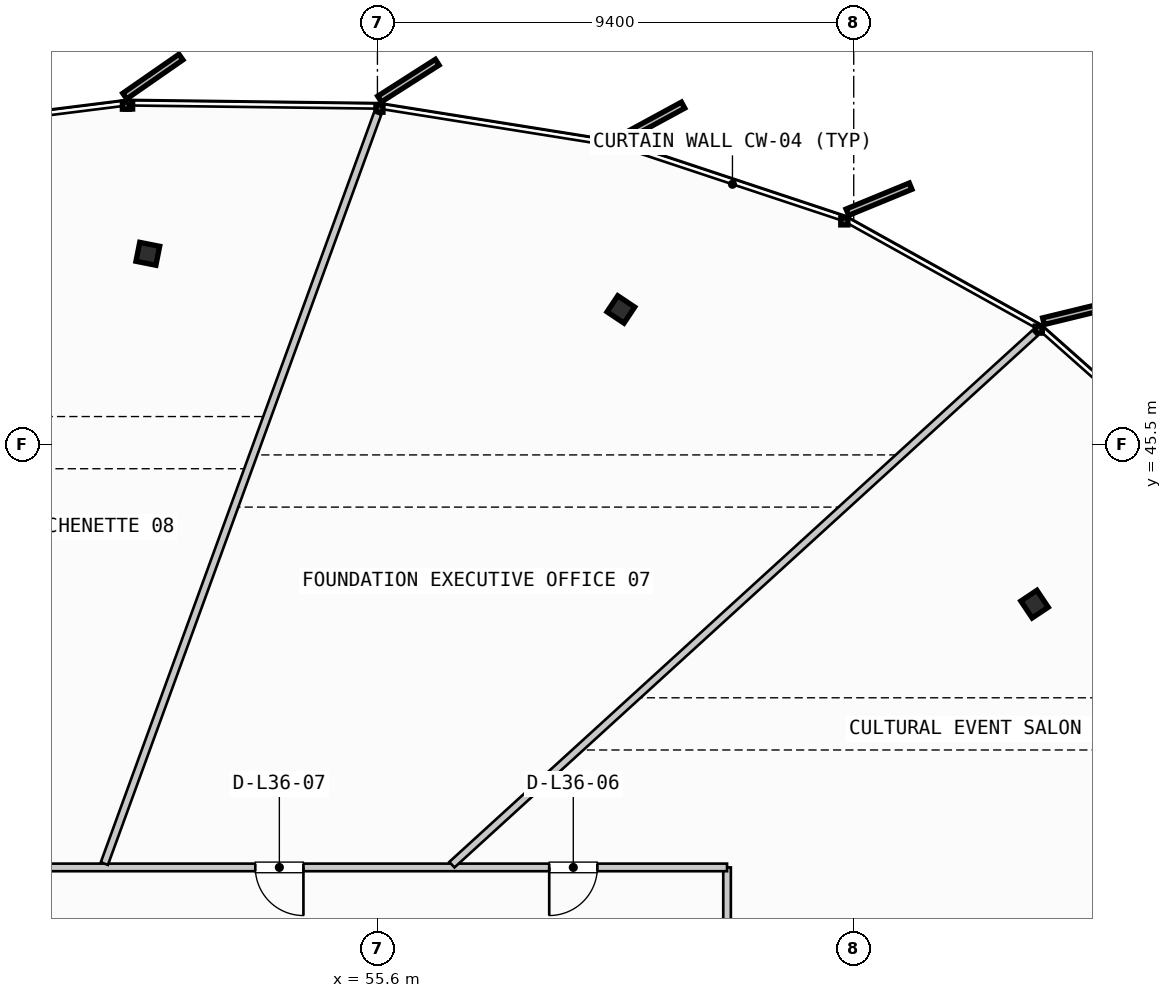
"""IFC4 building model, lengths in metres.
Left out: names, types, materials, properties, quantities, classifications, styles, units other than length and angle.
Written with IfcOpenShell. Run it as: python <this file> out.ifc"""

import sys

from ifc_helpers import new_model, si_unit, direction, frame, frame_2d, origin, origin_2d, place, context, subcontext, project, spatial, rectangle, i_section, extrude, source, transform, mapped, element, fill, save


model = new_model("IFC4")
c1 = context("Model", 3, precision=1e-05, world=origin(), true_north=direction((0.0, 1.0)))
c2 = subcontext(c1, "Body", "Model", "MODEL_VIEW")
j1 = project(units=[si_unit("LENGTHUNIT", "METRE"), si_unit("PLANEANGLEUNIT", "RADIAN")], contexts=[c1])
p1 = place(None, origin())
s1 = spatial("IfcSite", under=j1, at=p1, CompositionType="ELEMENT")
p2 = place(p1, origin())
s2 = spatial("IfcBuilding", under=s1, at=p2, CompositionType="ELEMENT")
p3 = place(p2, frame((0.0, 0.0, 143.0)))
s3 = spatial("IfcBuildingStorey", under=s2, at=p3, CompositionType="ELEMENT", Elevation=143.0)
m1 = source(origin(), c2, "Body", "SweptSolid", [
    extrude(i_section(OverallWidth=0.401, OverallDepth=0.381, WebThickness=0.032, FlangeThickness=0.051, FilletRadius=0.015, at=origin_2d()), origin(), (0.0, 0.0, 1.0), 3.3),
])
for number, where, z_axis, x_axis in (
    (1, (68.569, 42.345, 0.0), (0.0, 0.0, 1.0), (0.831, 0.556, 0.0)),
    (2, (60.405, 48.161, 0.0), (0.0, 0.0, 1.0), (0.556, 0.831, 0.0)),
    (3, (51.069, 49.259, 0.0), (0.0, 0.0, 1.0), (0.195, 0.981, 0.0)),
):
    element("IfcColumn", number, at=place(p3, frame(where, z_axis=z_axis, x_axis=x_axis)), inside=s3, PredefinedType="COLUMN", context=c2, shape_type="MappedRepresentation", body=[
        mapped(m1, transform((0.0, 0.0, 0.0), scale=1.0)),
    ])
p4 = place(p3, frame((62.5, 35.45, 0.0), z_axis=(0.0, 0.0, 1.0), x_axis=(0.0, 1.0, 0.0)))
e4 = element("IfcWall", 4, at=p4, inside=s3, PredefinedType="PARTITIONING", context=c2, shape_type="SweptSolid", body=[
    extrude(rectangle(XDim=1.7, YDim=0.15, at=frame_2d((0.85, 0.0))), origin(), (0.0, 0.0, 1.0), 2.305),
])
p5 = place(p3, frame((62.5, 37.15, 0.0), z_axis=(0.0, 0.0, 1.0), x_axis=(-1.0, 0.0, 0.0)))
e5 = element("IfcWall", 5, at=p5, inside=s3, PredefinedType="PARTITIONING", context=c2, shape_type="SweptSolid", body=[
    extrude(rectangle(XDim=31.4, YDim=0.15, at=frame_2d((15.7, 0.0))), origin(), (0.0, 0.0, 1.0), 2.305),
])
p6 = place(p5, frame((2.56, 0.0, 0.0)))
e6 = element("IfcOpeningElement", 6, at=p6, cuts=e5, PredefinedType="OPENING", context=c2, shape_type="SweptSolid", body=[
    extrude(rectangle(XDim=0.95, YDim=2.15, at=frame_2d((0.475, 1.075))), frame((0.0, 0.085, 0.0), z_axis=(0.0, -1.0, 0.0), x_axis=(1.0, 0.0, 0.0)), (0.0, 0.0, 1.0), 0.17),
])
p7 = place(p5, frame((8.361, 0.0, 0.0)))
e7 = element("IfcOpeningElement", 7, at=p7, cuts=e5, PredefinedType="OPENING", context=c2, shape_type="SweptSolid", body=[
    extrude(rectangle(XDim=0.95, YDim=2.15, at=frame_2d((0.475, 1.075))), frame((0.0, 0.085, 0.0), z_axis=(0.0, -1.0, 0.0), x_axis=(1.0, 0.0, 0.0)), (0.0, 0.0, 1.0), 0.17),
])
p8 = place(p5, frame((14.763, 0.0, 0.0)))
e8 = element("IfcOpeningElement", 8, at=p8, cuts=e5, PredefinedType="OPENING", context=c2, shape_type="SweptSolid", body=[
    extrude(rectangle(XDim=0.95, YDim=2.15, at=frame_2d((0.475, 1.075))), frame((0.0, 0.085, 0.0), z_axis=(0.0, -1.0, 0.0), x_axis=(1.0, 0.0, 0.0)), (0.0, 0.0, 1.0), 0.17),
])
p9 = place(p5, frame((22.302, 0.0, 0.0)))
e9 = element("IfcOpeningElement", 9, at=p9, cuts=e5, PredefinedType="OPENING", context=c2, shape_type="SweptSolid", body=[
    extrude(rectangle(XDim=0.95, YDim=2.15, at=frame_2d((0.475, 1.075))), frame((0.0, 0.085, 0.0), z_axis=(0.0, -1.0, 0.0), x_axis=(1.0, 0.0, 0.0)), (0.0, 0.0, 1.0), 0.17),
])
p10 = place(p3, frame((61.275, 32.897, 0.0), z_axis=(0.0, 0.0, 1.0), x_axis=(0.943252293623, 0.332076964837, 0.0)))
e10 = element("IfcWall", 10, at=p10, inside=s3, PredefinedType="PARTITIONING", context=c2, shape_type="SweptSolid", body=[
    extrude(rectangle(XDim=14.866, YDim=0.15, at=frame_2d((7.433, 0.0))), origin(), (0.0, 0.0, 1.0), 2.305),
])
p11 = place(p3, frame((57.07, 37.204, 0.0), z_axis=(0.0, 0.0, 1.0), x_axis=(0.738993722189, 0.673712311425, 0.0)))
e11 = element("IfcWall", 11, at=p11, inside=s3, PredefinedType="PARTITIONING", context=c2, shape_type="SweptSolid", body=[
    extrude(rectangle(XDim=15.573, YDim=0.15, at=frame_2d((7.786, 0.0))), origin(), (0.0, 0.0, 1.0), 2.305),
])
p12 = place(p3, frame((50.211, 37.225, 0.0), z_axis=(0.0, 0.0, 1.0), x_axis=(0.342383690123, 0.939560220921, 0.0)))
e12 = element("IfcWall", 12, at=p12, inside=s3, PredefinedType="PARTITIONING", context=c2, shape_type="SweptSolid", body=[
    extrude(rectangle(XDim=15.757, YDim=0.15, at=frame_2d((7.878, 0.0))), origin(), (0.0, 0.0, 1.0), 2.305),
])
m2 = source(origin(), c2, "Body", "SweptSolid", [
    extrude(rectangle(XDim=0.95, YDim=2.15, at=frame_2d((0.475, 1.075))), frame((0.0, 0.025, 0.0), z_axis=(0.0, -1.0, 0.0), x_axis=(1.0, 0.0, 0.0)), (0.0, 0.0, 1.0), 0.05),
])
p13 = place(p6, origin())
e13 = element("IfcDoor", 13, at=p13, inside=s3, OperationType="SINGLE_SWING_RIGHT", PredefinedType="DOOR", context=c2, shape_type="MappedRepresentation", body=[
    mapped(m2, transform((0.0, 0.0, 0.0), scale=1.0)),
])
fill(e6, e13)
p14 = place(p7, origin())
e14 = element("IfcDoor", 14, at=p14, inside=s3, OperationType="SINGLE_SWING_LEFT", PredefinedType="DOOR", context=c2, shape_type="MappedRepresentation", body=[
    mapped(m2, transform((0.0, 0.0, 0.0), scale=1.0)),
])
fill(e7, e14)
save(model, sys.argv[1])
